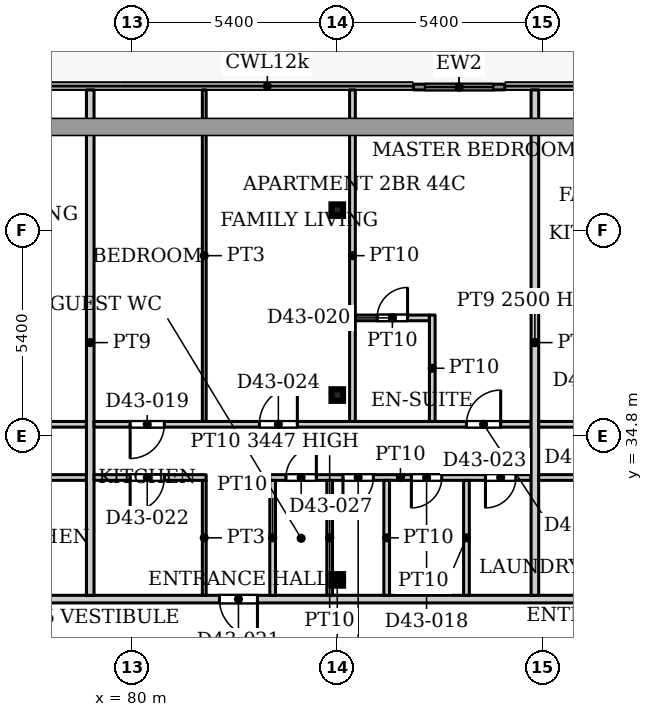
"""IFC4 building model, lengths in metres.
Left out: names, types, materials, properties, quantities, classifications, styles, units other than length and angle.
Written with IfcOpenShell. Run it as: python <this file> out.ifc"""

import sys

from ifc_helpers import new_model, si_unit, direction, frame, frame_2d, origin, origin_2d, place, context, subcontext, project, spatial, rectangle, hollow_rectangle, extrude, source, transform, mapped, element, fill, save


model = new_model("IFC4")
c1 = context("Model", 3, precision=1e-05, world=origin(), true_north=direction((0.0, 1.0)))
c2 = subcontext(c1, "Body", "Model", "MODEL_VIEW")
j1 = project(units=[si_unit("LENGTHUNIT", "METRE"), si_unit("PLANEANGLEUNIT", "RADIAN")], contexts=[c1])
p1 = place(None, origin())
s1 = spatial("IfcSite", under=j1, at=p1, CompositionType="ELEMENT")
p2 = place(p1, origin())
s2 = spatial("IfcBuilding", under=s1, at=p2, CompositionType="ELEMENT")
p3 = place(p2, frame((0.0, 0.0, 187.7)))
s3 = spatial("IfcBuildingStorey", under=s2, at=p3, CompositionType="ELEMENT", Elevation=187.7)
for number, where, z_axis, x_axis in (
    (1, (85.4, 31.005, 0.0), (0.0, 0.0, 1.0), (1.0, 0.0, 0.0)),
    (2, (85.4, 35.87, 0.0), (0.0, 0.0, 1.0), (1.0, 0.0, 0.0)),
    (3, (85.4, 40.735, 0.0), (0.0, 0.0, 1.0), (1.0, 0.0, 0.0)),
):
    element("IfcColumn", number, at=place(p3, frame(where, z_axis=z_axis, x_axis=x_axis)), inside=s3, PredefinedType="COLUMN", context=c2, shape_type="SweptSolid", body=[
        extrude(hollow_rectangle(XDim=0.305, YDim=0.305, WallThickness=0.016, InnerFilletRadius=0.016, OuterFilletRadius=0.032, at=origin_2d()), origin(), (0.0, 0.0, 1.0), 3.9),
    ])
p4 = place(p3, frame((87.406, 43.975, 0.0), z_axis=(0.0, 0.0, 1.0), x_axis=(1.0, 0.0, 0.0)))
e4 = element("IfcWall", 4, at=p4, inside=s3, PredefinedType="SOLIDWALL", context=c2, shape_type="SweptSolid", body=[
    extrude(rectangle(XDim=2.4, YDim=0.15, at=frame_2d((1.2, 0.0))), origin(), (0.0, 0.0, 1.0), 3.75),
])
p5 = place(p4, frame((0.3, 0.0, 0.0)))
e5 = element("IfcOpeningElement", 5, at=p5, cuts=e4, PredefinedType="OPENING", context=c2, shape_type="SweptSolid", body=[
    extrude(rectangle(XDim=1.8, YDim=2.4, at=frame_2d((0.9, 1.2))), frame((0.0, 0.085, 0.0), z_axis=(0.0, -1.0, 0.0), x_axis=(1.0, 0.0, 0.0)), (0.0, 0.0, 1.0), 0.17),
])
p6 = place(p3, frame((53.549, 30.5, 0.0), z_axis=(0.0, 0.0, 1.0), x_axis=(1.0, 0.0, 0.0)))
e6 = element("IfcWall", 6, at=p6, inside=s3, PredefinedType="PARTITIONING", context=c2, shape_type="SweptSolid", body=[
    extrude(rectangle(XDim=44.551, YDim=0.2, at=frame_2d((22.275, 0.0))), origin(), (0.0, 0.0, 1.0), 3.6),
])
p7 = place(p6, frame((8.351, 0.0, 0.0)))
e7 = element("IfcOpeningElement", 7, at=p7, cuts=e6, PredefinedType="OPENING", context=c2, shape_type="SweptSolid", body=[
    extrude(rectangle(XDim=1.0, YDim=2.1, at=frame_2d((0.5, 1.05))), frame((0.0, 0.11, 0.0), z_axis=(0.0, -1.0, 0.0), x_axis=(1.0, 0.0, 0.0)), (0.0, 0.0, 1.0), 0.22),
])
p8 = place(p6, frame((12.551, 0.0, 0.0)))
e8 = element("IfcOpeningElement", 8, at=p8, cuts=e6, PredefinedType="OPENING", context=c2, shape_type="SweptSolid", body=[
    extrude(rectangle(XDim=1.0, YDim=2.1, at=frame_2d((0.5, 1.05))), frame((0.0, 0.11, 0.0), z_axis=(0.0, -1.0, 0.0), x_axis=(1.0, 0.0, 0.0)), (0.0, 0.0, 1.0), 0.22),
])
p9 = place(p6, frame((28.751, 0.0, 0.0)))
e9 = element("IfcOpeningElement", 9, at=p9, cuts=e6, PredefinedType="OPENING", context=c2, shape_type="SweptSolid", body=[
    extrude(rectangle(XDim=1.0, YDim=2.1, at=frame_2d((0.5, 1.05))), frame((0.0, 0.11, 0.0), z_axis=(0.0, -1.0, 0.0), x_axis=(1.0, 0.0, 0.0)), (0.0, 0.0, 1.0), 0.22),
])
p10 = place(p6, frame((40.751, 0.0, 0.0)))
e10 = element("IfcOpeningElement", 10, at=p10, cuts=e6, PredefinedType="OPENING", context=c2, shape_type="SweptSolid", body=[
    extrude(rectangle(XDim=1.0, YDim=2.1, at=frame_2d((0.5, 1.05))), frame((0.0, 0.11, 0.0), z_axis=(0.0, -1.0, 0.0), x_axis=(1.0, 0.0, 0.0)), (0.0, 0.0, 1.0), 0.22),
])
p11 = place(p3, frame((65.5, 35.1, 0.0), z_axis=(0.0, 0.0, 1.0), x_axis=(1.0, 0.0, 0.0)))
e11 = element("IfcWall", 11, at=p11, inside=s3, PredefinedType="PARTITIONING", context=c2, shape_type="SweptSolid", body=[
    extrude(rectangle(XDim=13.3, YDim=0.15, at=frame_2d((6.65, 0.0))), origin(), (0.0, 0.0, 1.0), 3.6),
])
p12 = place(p11, frame((1.4, 0.0, 0.0)))
e12 = element("IfcOpeningElement", 12, at=p12, cuts=e11, PredefinedType="OPENING", context=c2, shape_type="SweptSolid", body=[
    extrude(rectangle(XDim=0.9, YDim=2.1, at=frame_2d((0.45, 1.05))), frame((0.0, 0.085, 0.0), z_axis=(0.0, -1.0, 0.0), x_axis=(1.0, 0.0, 0.0)), (0.0, 0.0, 1.0), 0.17),
])
p13 = place(p11, frame((10.5, 0.0, 0.0)))
e13 = element("IfcOpeningElement", 13, at=p13, cuts=e11, PredefinedType="OPENING", context=c2, shape_type="SweptSolid", body=[
    extrude(rectangle(XDim=1.0, YDim=2.1, at=frame_2d((0.5, 1.05))), frame((0.0, 0.085, 0.0), z_axis=(0.0, -1.0, 0.0), x_axis=(1.0, 0.0, 0.0)), (0.0, 0.0, 1.0), 0.17),
])
p14 = place(p11, frame((6.8, 0.0, 0.0)))
e14 = element("IfcOpeningElement", 14, at=p14, cuts=e11, PredefinedType="OPENING", context=c2, shape_type="SweptSolid", body=[
    extrude(rectangle(XDim=0.9, YDim=2.1, at=frame_2d((0.45, 1.05))), frame((0.0, 0.085, 0.0), z_axis=(0.0, -1.0, 0.0), x_axis=(1.0, 0.0, 0.0)), (0.0, 0.0, 1.0), 0.17),
])
p15 = place(p3, frame((68.625, 33.7, 0.0), z_axis=(0.0, 0.0, 1.0), x_axis=(1.0, 0.0, 0.0)))
e15 = element("IfcWall", 15, at=p15, inside=s3, PredefinedType="PARTITIONING", context=c2, shape_type="SweptSolid", body=[
    extrude(rectangle(XDim=10.175, YDim=0.15, at=frame_2d((5.087, 0.0))), origin(), (0.0, 0.0, 1.0), 3.6),
])
p16 = place(p15, frame((1.175, 0.0, 0.0)))
e16 = element("IfcOpeningElement", 16, at=p16, cuts=e15, PredefinedType="OPENING", context=c2, shape_type="SweptSolid", body=[
    extrude(rectangle(XDim=0.8, YDim=2.1, at=frame_2d((0.4, 1.05))), frame((0.0, 0.085, 0.0), z_axis=(0.0, -1.0, 0.0), x_axis=(1.0, 0.0, 0.0)), (0.0, 0.0, 1.0), 0.17),
])
p17 = place(p15, frame((7.025, 0.0, 0.0)))
e17 = element("IfcOpeningElement", 17, at=p17, cuts=e15, PredefinedType="OPENING", context=c2, shape_type="SweptSolid", body=[
    extrude(rectangle(XDim=0.9, YDim=2.1, at=frame_2d((0.45, 1.05))), frame((0.0, 0.085, 0.0), z_axis=(0.0, -1.0, 0.0), x_axis=(1.0, 0.0, 0.0)), (0.0, 0.0, 1.0), 0.17),
])
p18 = place(p15, frame((3.875, 0.0, 0.0)))
e18 = element("IfcOpeningElement", 18, at=p18, cuts=e15, PredefinedType="OPENING", context=c2, shape_type="SweptSolid", body=[
    extrude(rectangle(XDim=0.8, YDim=2.1, at=frame_2d((0.4, 1.05))), frame((0.0, 0.085, 0.0), z_axis=(0.0, -1.0, 0.0), x_axis=(1.0, 0.0, 0.0)), (0.0, 0.0, 1.0), 0.17),
])
p19 = place(p3, frame((78.9, 30.6, 0.0), z_axis=(0.0, 0.0, 1.0), x_axis=(0.0, 1.0, 0.0)))
e19 = element("IfcWall", 19, at=p19, inside=s3, PredefinedType="PARTITIONING", context=c2, shape_type="SweptSolid", body=[
    extrude(rectangle(XDim=13.3, YDim=0.2, at=frame_2d((6.65, 0.0))), origin(), (0.0, 0.0, 1.0), 3.6),
])
p20 = place(p3, frame((79.0, 33.7, 0.0), z_axis=(0.0, 0.0, 1.0), x_axis=(1.0, 0.0, 0.0)))
e20 = element("IfcWall", 20, at=p20, inside=s3, PredefinedType="PARTITIONING", context=c2, shape_type="SweptSolid", body=[
    extrude(rectangle(XDim=2.95, YDim=0.15, at=frame_2d((1.475, 0.0))), origin(), (0.0, 0.0, 1.0), 3.6),
])
p21 = place(p20, frame((0.95, 0.0, 0.0)))
e21 = element("IfcOpeningElement", 21, at=p21, cuts=e20, PredefinedType="OPENING", context=c2, shape_type="SweptSolid", body=[
    extrude(rectangle(XDim=0.9, YDim=2.1, at=frame_2d((0.45, 1.05))), frame((0.0, 0.085, 0.0), z_axis=(0.0, -1.0, 0.0), x_axis=(1.0, 0.0, 0.0)), (0.0, 0.0, 1.0), 0.17),
])
p22 = place(p3, frame((79.0, 35.1, 0.0), z_axis=(0.0, 0.0, 1.0), x_axis=(1.0, 0.0, 0.0)))
e22 = element("IfcWall", 22, at=p22, inside=s3, PredefinedType="PARTITIONING", context=c2, shape_type="SweptSolid", body=[
    extrude(rectangle(XDim=11.5, YDim=0.15, at=frame_2d((5.75, 0.0))), origin(), (0.0, 0.0, 1.0), 3.6),
])
p23 = place(p22, frame((0.95, 0.0, 0.0)))
e23 = element("IfcOpeningElement", 23, at=p23, cuts=e22, PredefinedType="OPENING", context=c2, shape_type="SweptSolid", body=[
    extrude(rectangle(XDim=0.9, YDim=2.1, at=frame_2d((0.45, 1.05))), frame((0.0, 0.085, 0.0), z_axis=(0.0, -1.0, 0.0), x_axis=(1.0, 0.0, 0.0)), (0.0, 0.0, 1.0), 0.17),
])
p24 = place(p22, frame((4.35, 0.0, 0.0)))
e24 = element("IfcOpeningElement", 24, at=p24, cuts=e22, PredefinedType="OPENING", context=c2, shape_type="SweptSolid", body=[
    extrude(rectangle(XDim=1.0, YDim=2.1, at=frame_2d((0.5, 1.05))), frame((0.0, 0.085, 0.0), z_axis=(0.0, -1.0, 0.0), x_axis=(1.0, 0.0, 0.0)), (0.0, 0.0, 1.0), 0.17),
])
p25 = place(p22, frame((9.8, 0.0, 0.0)))
e25 = element("IfcOpeningElement", 25, at=p25, cuts=e22, PredefinedType="OPENING", context=c2, shape_type="SweptSolid", body=[
    extrude(rectangle(XDim=0.9, YDim=2.1, at=frame_2d((0.45, 1.05))), frame((0.0, 0.085, 0.0), z_axis=(0.0, -1.0, 0.0), x_axis=(1.0, 0.0, 0.0)), (0.0, 0.0, 1.0), 0.17),
])
p26 = place(p3, frame((81.9, 30.6, 0.0), z_axis=(0.0, 0.0, 1.0), x_axis=(0.0, 1.0, 0.0)))
e26 = element("IfcWall", 26, at=p26, inside=s3, PredefinedType="PARTITIONING", context=c2, shape_type="SweptSolid", body=[
    extrude(rectangle(XDim=3.025, YDim=0.1, at=frame_2d((1.512, 0.0))), origin(), (0.0, 0.0, 1.0), 3.6),
])
p27 = place(p3, frame((81.9, 35.175, 0.0), z_axis=(0.0, 0.0, 1.0), x_axis=(0.0, 1.0, 0.0)))
e27 = element("IfcWall", 27, at=p27, inside=s3, PredefinedType="PARTITIONING", context=c2, shape_type="SweptSolid", body=[
    extrude(rectangle(XDim=8.725, YDim=0.1, at=frame_2d((4.362, 0.0))), origin(), (0.0, 0.0, 1.0), 3.6),
])
p28 = place(p3, frame((83.625, 33.7, 0.0), z_axis=(0.0, 0.0, 1.0), x_axis=(1.0, 0.0, 0.0)))
e28 = element("IfcWall", 28, at=p28, inside=s3, PredefinedType="PARTITIONING", context=c2, shape_type="SweptSolid", body=[
    extrude(rectangle(XDim=6.875, YDim=0.15, at=frame_2d((3.438, 0.0))), origin(), (0.0, 0.0, 1.0), 3.6),
])
p29 = place(p28, frame((3.725, 0.0, 0.0)))
e29 = element("IfcOpeningElement", 29, at=p29, cuts=e28, PredefinedType="OPENING", context=c2, shape_type="SweptSolid", body=[
    extrude(rectangle(XDim=0.8, YDim=2.1, at=frame_2d((0.4, 1.05))), frame((0.0, 0.085, 0.0), z_axis=(0.0, -1.0, 0.0), x_axis=(1.0, 0.0, 0.0)), (0.0, 0.0, 1.0), 0.17),
])
p30 = place(p28, frame((5.675, 0.0, 0.0)))
e30 = element("IfcOpeningElement", 30, at=p30, cuts=e28, PredefinedType="OPENING", context=c2, shape_type="SweptSolid", body=[
    extrude(rectangle(XDim=0.8, YDim=2.1, at=frame_2d((0.4, 1.05))), frame((0.0, 0.085, 0.0), z_axis=(0.0, -1.0, 0.0), x_axis=(1.0, 0.0, 0.0)), (0.0, 0.0, 1.0), 0.17),
])
p31 = place(p28, frame((1.925, 0.0, 0.0)))
e31 = element("IfcOpeningElement", 31, at=p31, cuts=e28, PredefinedType="OPENING", context=c2, shape_type="SweptSolid", body=[
    extrude(rectangle(XDim=0.8, YDim=2.1, at=frame_2d((0.4, 1.05))), frame((0.0, 0.085, 0.0), z_axis=(0.0, -1.0, 0.0), x_axis=(1.0, 0.0, 0.0)), (0.0, 0.0, 1.0), 0.17),
])
p32 = place(p28, frame((0.425, 0.0, 0.0)))
e32 = element("IfcOpeningElement", 32, at=p32, cuts=e28, PredefinedType="OPENING", context=c2, shape_type="SweptSolid", body=[
    extrude(rectangle(XDim=0.8, YDim=2.1, at=frame_2d((0.4, 1.05))), frame((0.0, 0.085, 0.0), z_axis=(0.0, -1.0, 0.0), x_axis=(1.0, 0.0, 0.0)), (0.0, 0.0, 1.0), 0.17),
])
p33 = place(p3, frame((83.7, 30.6, 0.0), z_axis=(0.0, 0.0, 1.0), x_axis=(0.0, 1.0, 0.0)))
e33 = element("IfcWall", 33, at=p33, inside=s3, PredefinedType="PARTITIONING", context=c2, shape_type="SweptSolid", body=[
    extrude(rectangle(XDim=3.025, YDim=0.15, at=frame_2d((1.512, 0.0))), origin(), (0.0, 0.0, 1.0), 3.6),
])
p34 = place(p3, frame((85.2, 30.6, 0.0), z_axis=(0.0, 0.0, 1.0), x_axis=(0.0, 1.0, 0.0)))
e34 = element("IfcWall", 34, at=p34, inside=s3, PredefinedType="PARTITIONING", context=c2, shape_type="SweptSolid", body=[
    extrude(rectangle(XDim=3.025, YDim=0.15, at=frame_2d((1.512, 0.0))), origin(), (0.0, 0.0, 1.0), 3.447),
])
p35 = place(p3, frame((85.8, 35.175, 0.0), z_axis=(0.0, 0.0, 1.0), x_axis=(0.0, 1.0, 0.0)))
e35 = element("IfcWall", 35, at=p35, inside=s3, PredefinedType="PARTITIONING", context=c2, shape_type="SweptSolid", body=[
    extrude(rectangle(XDim=8.725, YDim=0.15, at=frame_2d((4.362, 0.0))), origin(), (0.0, 0.0, 1.0), 3.6),
])
p36 = place(p3, frame((85.875, 37.9, 0.0), z_axis=(0.0, 0.0, 1.0), x_axis=(1.0, 0.0, 0.0)))
e36 = element("IfcWall", 36, at=p36, inside=s3, PredefinedType="PARTITIONING", context=c2, shape_type="SweptSolid", body=[
    extrude(rectangle(XDim=1.95, YDim=0.15, at=frame_2d((0.975, 0.0))), origin(), (0.0, 0.0, 1.0), 3.6),
])
p37 = place(p36, frame((0.575, 0.0, 0.0)))
e37 = element("IfcOpeningElement", 37, at=p37, cuts=e36, PredefinedType="OPENING", context=c2, shape_type="SweptSolid", body=[
    extrude(rectangle(XDim=0.8, YDim=2.1, at=frame_2d((0.4, 1.05))), frame((0.0, 0.085, 0.0), z_axis=(0.0, -1.0, 0.0), x_axis=(1.0, 0.0, 0.0)), (0.0, 0.0, 1.0), 0.17),
])
p38 = place(p3, frame((86.7, 30.6, 0.0), z_axis=(0.0, 0.0, 1.0), x_axis=(0.0, 1.0, 0.0)))
e38 = element("IfcWall", 38, at=p38, inside=s3, PredefinedType="PARTITIONING", context=c2, shape_type="SweptSolid", body=[
    extrude(rectangle(XDim=3.025, YDim=0.15, at=frame_2d((1.512, 0.0))), origin(), (0.0, 0.0, 1.0), 3.6),
])
p39 = place(p3, frame((87.9, 35.175, 0.0), z_axis=(0.0, 0.0, 1.0), x_axis=(0.0, 1.0, 0.0)))
e39 = element("IfcWall", 39, at=p39, inside=s3, PredefinedType="PARTITIONING", context=c2, shape_type="SweptSolid", body=[
    extrude(rectangle(XDim=2.8, YDim=0.15, at=frame_2d((1.4, 0.0))), origin(), (0.0, 0.0, 1.0), 3.6),
])
p40 = place(p3, frame((88.8, 30.6, 0.0), z_axis=(0.0, 0.0, 1.0), x_axis=(0.0, 1.0, 0.0)))
e40 = element("IfcWall", 40, at=p40, inside=s3, PredefinedType="PARTITIONING", context=c2, shape_type="SweptSolid", body=[
    extrude(rectangle(XDim=3.025, YDim=0.15, at=frame_2d((1.512, 0.0))), origin(), (0.0, 0.0, 1.0), 3.6),
])
p41 = place(p3, frame((90.6, 30.6, 0.0), z_axis=(0.0, 0.0, 1.0), x_axis=(0.0, 1.0, 0.0)))
e41 = element("IfcWall", 41, at=p41, inside=s3, PredefinedType="PARTITIONING", context=c2, shape_type="SweptSolid", body=[
    extrude(rectangle(XDim=13.3, YDim=0.2, at=frame_2d((6.65, 0.0))), origin(), (0.0, 0.0, 1.0), 2.5),
])
p42 = place(p3, frame((90.7, 33.7, 0.0), z_axis=(0.0, 0.0, 1.0), x_axis=(1.0, 0.0, 0.0)))
e42 = element("IfcWall", 42, at=p42, inside=s3, PredefinedType="PARTITIONING", context=c2, shape_type="SweptSolid", body=[
    extrude(rectangle(XDim=3.25, YDim=0.15, at=frame_2d((1.625, 0.0))), origin(), (0.0, 0.0, 1.0), 3.6),
])
p43 = place(p42, frame((1.1, 0.0, 0.0)))
e43 = element("IfcOpeningElement", 43, at=p43, cuts=e42, PredefinedType="OPENING", context=c2, shape_type="SweptSolid", body=[
    extrude(rectangle(XDim=0.9, YDim=2.1, at=frame_2d((0.45, 1.05))), frame((0.0, 0.085, 0.0), z_axis=(0.0, -1.0, 0.0), x_axis=(1.0, 0.0, 0.0)), (0.0, 0.0, 1.0), 0.17),
])
p44 = place(p3, frame((90.7, 35.1, 0.0), z_axis=(0.0, 0.0, 1.0), x_axis=(1.0, 0.0, 0.0)))
e44 = element("IfcWall", 44, at=p44, inside=s3, PredefinedType="PARTITIONING", context=c2, shape_type="SweptSolid", body=[
    extrude(rectangle(XDim=9.2, YDim=0.15, at=frame_2d((4.6, 0.0))), origin(), (0.0, 0.0, 1.0), 3.6),
])
p45 = place(p44, frame((6.8, 0.0, 0.0)))
e45 = element("IfcOpeningElement", 45, at=p45, cuts=e44, PredefinedType="OPENING", context=c2, shape_type="SweptSolid", body=[
    extrude(rectangle(XDim=0.9, YDim=2.1, at=frame_2d((0.45, 1.05))), frame((0.0, 0.085, 0.0), z_axis=(0.0, -1.0, 0.0), x_axis=(1.0, 0.0, 0.0)), (0.0, 0.0, 1.0), 0.17),
])
p46 = place(p44, frame((2.1, 0.0, 0.0)))
e46 = element("IfcOpeningElement", 46, at=p46, cuts=e44, PredefinedType="OPENING", context=c2, shape_type="SweptSolid", body=[
    extrude(rectangle(XDim=1.0, YDim=2.1, at=frame_2d((0.5, 1.05))), frame((0.0, 0.085, 0.0), z_axis=(0.0, -1.0, 0.0), x_axis=(1.0, 0.0, 0.0)), (0.0, 0.0, 1.0), 0.17),
])
m1 = source(origin(), c2, "Body", "SweptSolid", [
    extrude(rectangle(XDim=1.8, YDim=2.4, at=frame_2d((0.9, 1.2))), frame((0.0, 0.025, 0.0), z_axis=(0.0, -1.0, 0.0), x_axis=(1.0, 0.0, 0.0)), (0.0, 0.0, 1.0), 0.05),
])
p47 = place(p5, origin())
e47 = element("IfcDoor", 47, at=p47, inside=s3, OperationType="SLIDING_TO_LEFT", PredefinedType="DOOR", context=c2, shape_type="MappedRepresentation", body=[
    mapped(m1, transform((0.0, 0.0, 0.0), x_axis=(1.0, 0.0, 0.0), y_axis=(0.0, 1.0, 0.0), z_axis=(0.0, 0.0, 1.0), scale=1.0)),
])
fill(e5, e47)
m2 = source(origin(), c2, "Body", "SweptSolid", [
    extrude(rectangle(XDim=0.8, YDim=2.1, at=frame_2d((0.4, 1.05))), frame((0.0, 0.025, 0.0), z_axis=(0.0, -1.0, 0.0), x_axis=(1.0, 0.0, 0.0)), (0.0, 0.0, 1.0), 0.05),
])
p48 = place(p29, origin())
e48 = element("IfcDoor", 48, at=p48, inside=s3, OperationType="SINGLE_SWING_RIGHT", PredefinedType="DOOR", context=c2, shape_type="MappedRepresentation", body=[
    mapped(m2, transform((0.0, 0.0, 0.0), x_axis=(1.0, 0.0, 0.0), y_axis=(0.0, 1.0, 0.0), z_axis=(0.0, 0.0, 1.0), scale=1.0)),
])
fill(e29, e48)
m3 = source(origin(), c2, "Body", "SweptSolid", [
    extrude(rectangle(XDim=0.9, YDim=2.1, at=frame_2d((0.45, 1.05))), frame((0.0, 0.025, 0.0), z_axis=(0.0, -1.0, 0.0), x_axis=(1.0, 0.0, 0.0)), (0.0, 0.0, 1.0), 0.05),
])
p49 = place(p23, origin())
e49 = element("IfcDoor", 49, at=p49, inside=s3, OperationType="SINGLE_SWING_RIGHT", PredefinedType="DOOR", context=c2, shape_type="MappedRepresentation", body=[
    mapped(m3, transform((0.0, 0.0, 0.0), x_axis=(1.0, 0.0, 0.0), y_axis=(0.0, 1.0, 0.0), z_axis=(0.0, 0.0, 1.0), scale=1.0)),
])
fill(e23, e49)
p50 = place(p37, origin())
e50 = element("IfcDoor", 50, at=p50, inside=s3, OperationType="SINGLE_SWING_LEFT", PredefinedType="DOOR", context=c2, shape_type="MappedRepresentation", body=[
    mapped(m2, transform((0.0, 0.0, 0.0), x_axis=(1.0, 0.0, 0.0), y_axis=(0.0, 1.0, 0.0), z_axis=(0.0, 0.0, 1.0), scale=1.0)),
])
fill(e37, e50)
m4 = source(origin(), c2, "Body", "SweptSolid", [
    extrude(rectangle(XDim=1.0, YDim=2.1, at=frame_2d((0.5, 1.05))), frame((0.0, 0.025, 0.0), z_axis=(0.0, -1.0, 0.0), x_axis=(1.0, 0.0, 0.0)), (0.0, 0.0, 1.0), 0.05),
])
p51 = place(p9, origin())
e51 = element("IfcDoor", 51, at=p51, inside=s3, OperationType="SINGLE_SWING_RIGHT", PredefinedType="DOOR", context=c2, shape_type="MappedRepresentation", body=[
    mapped(m4, transform((0.0, 0.0, 0.0), x_axis=(1.0, 0.0, 0.0), y_axis=(0.0, 1.0, 0.0), z_axis=(0.0, 0.0, 1.0), scale=1.0)),
])
fill(e9, e51)
p52 = place(p21, origin())
e52 = element("IfcDoor", 52, at=p52, inside=s3, OperationType="SINGLE_SWING_RIGHT", PredefinedType="DOOR", context=c2, shape_type="MappedRepresentation", body=[
    mapped(m3, transform((0.0, 0.0, 0.0), x_axis=(1.0, 0.0, 0.0), y_axis=(0.0, 1.0, 0.0), z_axis=(0.0, 0.0, 1.0), scale=1.0)),
])
fill(e21, e52)
p53 = place(p30, origin())
e53 = element("IfcDoor", 53, at=p53, inside=s3, OperationType="SINGLE_SWING_RIGHT", PredefinedType="DOOR", context=c2, shape_type="MappedRepresentation", body=[
    mapped(m2, transform((0.0, 0.0, 0.0), x_axis=(1.0, 0.0, 0.0), y_axis=(0.0, 1.0, 0.0), z_axis=(0.0, 0.0, 1.0), scale=1.0)),
])
fill(e30, e53)
m5 = source(origin(), c2, "Body", "SweptSolid", [
    extrude(rectangle(XDim=1.0, YDim=2.1, at=frame_2d((0.5, 1.05))), frame((0.0, 0.025, 0.0), z_axis=(0.0, -1.0, 0.0), x_axis=(1.0, 0.0, 0.0)), (0.0, 0.0, 1.0), 0.05),
])
p54 = place(p24, origin())
e54 = element("IfcDoor", 54, at=p54, inside=s3, OperationType="SINGLE_SWING_LEFT", PredefinedType="DOOR", context=c2, shape_type="MappedRepresentation", body=[
    mapped(m5, transform((0.0, 0.0, 0.0), x_axis=(1.0, 0.0, 0.0), y_axis=(0.0, 1.0, 0.0), z_axis=(0.0, 0.0, 1.0), scale=1.0)),
])
fill(e24, e54)
p55 = place(p25, origin())
e55 = element("IfcDoor", 55, at=p55, inside=s3, OperationType="SINGLE_SWING_LEFT", PredefinedType="DOOR", context=c2, shape_type="MappedRepresentation", body=[
    mapped(m3, transform((0.0, 0.0, 0.0), x_axis=(1.0, 0.0, 0.0), y_axis=(0.0, 1.0, 0.0), z_axis=(0.0, 0.0, 1.0), scale=1.0)),
])
fill(e25, e55)
p56 = place(p31, origin())
e56 = element("IfcDoor", 56, at=p56, inside=s3, OperationType="SINGLE_SWING_RIGHT", PredefinedType="DOOR", context=c2, shape_type="MappedRepresentation", body=[
    mapped(m2, transform((0.0, 0.0, 0.0), x_axis=(1.0, 0.0, 0.0), y_axis=(0.0, 1.0, 0.0), z_axis=(0.0, 0.0, 1.0), scale=1.0)),
])
fill(e31, e56)
p57 = place(p32, origin())
e57 = element("IfcDoor", 57, at=p57, inside=s3, OperationType="SINGLE_SWING_LEFT", PredefinedType="DOOR", context=c2, shape_type="MappedRepresentation", body=[
    mapped(m2, transform((0.0, 0.0, 0.0), x_axis=(1.0, 0.0, 0.0), y_axis=(0.0, 1.0, 0.0), z_axis=(0.0, 0.0, 1.0), scale=1.0)),
])
fill(e32, e57)
save(model, sys.argv[1])
